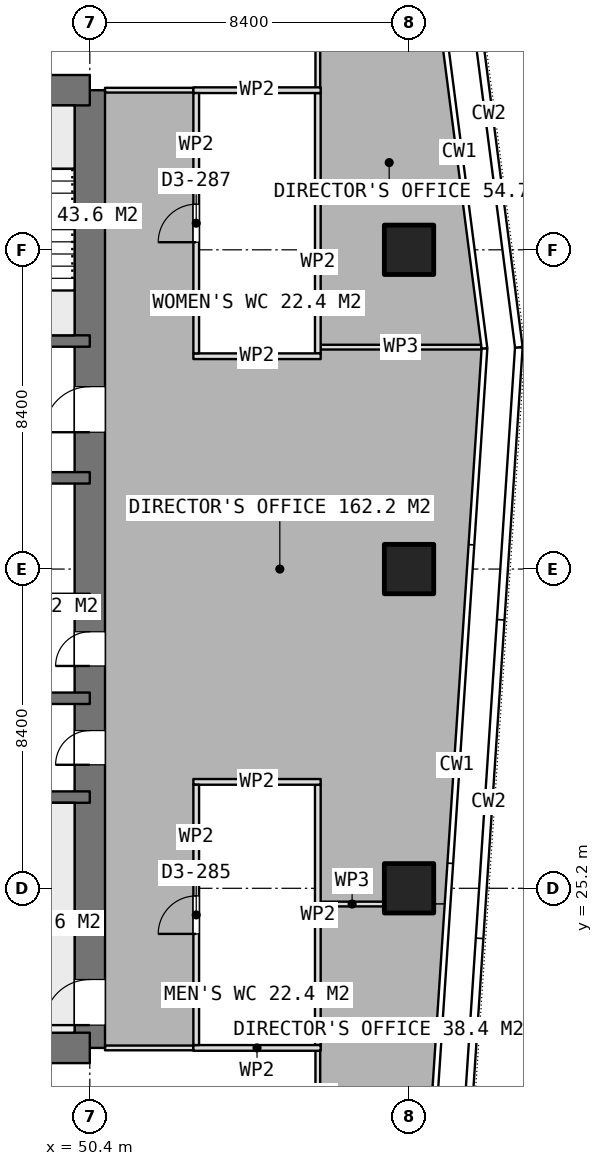
"""IFC4 building model, lengths in metres.
Left out: names, types, materials, properties, quantities, classifications, styles, units other than length and angle.
Written with IfcOpenShell. Run it as: python <this file> out.ifc"""

import sys

from ifc_helpers import new_model, si_unit, direction, frame, frame_2d, origin, origin_2d, place, context, subcontext, project, spatial, rectangle, extrude, element, fill, save


model = new_model("IFC4")
c1 = context("Model", 3, precision=1e-05, world=origin(), true_north=direction((0.0, 1.0)))
c2 = subcontext(c1, "Body", "Model", "MODEL_VIEW")
j1 = project(units=[si_unit("LENGTHUNIT", "METRE"), si_unit("PLANEANGLEUNIT", "RADIAN")], contexts=[c1])
p1 = place(None, origin())
s1 = spatial("IfcSite", under=j1, at=p1, CompositionType="ELEMENT")
p2 = place(p1, origin())
s2 = spatial("IfcBuilding", under=s1, at=p2, CompositionType="ELEMENT")
p3 = place(p2, frame((0.0, 0.0, 265.1)))
s3 = spatial("IfcBuildingStorey", under=s2, at=p3, CompositionType="ELEMENT", Elevation=265.1)
for number, where, z_axis, x_axis in (
    (1, (40.0, 21.0, 0.0), (0.0, 0.0, 1.0), (1.0, 0.0, 0.0)),
    (2, (40.0, 46.2, 0.0), (0.0, 0.0, 1.0), (1.0, 0.0, 0.0)),
):
    element("IfcWall", number, at=place(p3, frame(where, z_axis=z_axis, x_axis=x_axis)), inside=s3, PredefinedType="SHEAR", context=c2, shape_type="SweptSolid", body=[
        extrude(rectangle(XDim=10.4, YDim=0.8, at=frame_2d((5.2, 0.0))), origin(), (0.0, 0.0, 1.0), 3.75),
    ])
p4 = place(p3, frame((50.4, 21.0, 0.0), z_axis=(0.0, 0.0, 1.0), x_axis=(0.0, 1.0, 0.0)))
e3 = element("IfcWall", 3, at=p4, inside=s3, PredefinedType="SHEAR", context=c2, shape_type="SweptSolid", body=[
    extrude(rectangle(XDim=25.2, YDim=0.8, at=frame_2d((12.6, 0.0))), origin(), (0.0, 0.0, 1.0), 3.75),
])
p5 = place(p4, frame((16.2, 0.0, 0.0)))
e4 = element("IfcOpeningElement", 4, at=p5, cuts=e3, PredefinedType="OPENING", context=c2, shape_type="SweptSolid", body=[
    extrude(rectangle(XDim=1.2, YDim=2.1, at=frame_2d((0.6, 1.05))), frame((0.0, 0.41, 0.0), z_axis=(0.0, -1.0, 0.0), x_axis=(1.0, 0.0, 0.0)), (0.0, 0.0, 1.0), 0.82),
])
p6 = place(p4, frame((10.05, 0.0, 0.0)))
e5 = element("IfcOpeningElement", 5, at=p6, cuts=e3, PredefinedType="OPENING", context=c2, shape_type="SweptSolid", body=[
    extrude(rectangle(XDim=0.9, YDim=2.1, at=frame_2d((0.45, 1.05))), frame((0.0, 0.41, 0.0), z_axis=(0.0, -1.0, 0.0), x_axis=(1.0, 0.0, 0.0)), (0.0, 0.0, 1.0), 0.82),
])
p7 = place(p4, frame((7.45, 0.0, 0.0)))
e6 = element("IfcOpeningElement", 6, at=p7, cuts=e3, PredefinedType="OPENING", context=c2, shape_type="SweptSolid", body=[
    extrude(rectangle(XDim=0.9, YDim=2.1, at=frame_2d((0.45, 1.05))), frame((0.0, 0.41, 0.0), z_axis=(0.0, -1.0, 0.0), x_axis=(1.0, 0.0, 0.0)), (0.0, 0.0, 1.0), 0.82),
])
p8 = place(p4, frame((0.6, 0.0, 0.0)))
e7 = element("IfcOpeningElement", 7, at=p8, cuts=e3, PredefinedType="OPENING", context=c2, shape_type="SweptSolid", body=[
    extrude(rectangle(XDim=1.2, YDim=2.1, at=frame_2d((0.6, 1.05))), frame((0.0, 0.41, 0.0), z_axis=(0.0, -1.0, 0.0), x_axis=(1.0, 0.0, 0.0)), (0.0, 0.0, 1.0), 0.82),
])
for number, where, z_axis, x_axis in (
    (8, (43.8, 27.6, 0.0), (0.0, 0.0, 1.0), (1.0, 0.0, 0.0)),
    (9, (43.8, 30.2, 0.0), (0.0, 0.0, 1.0), (1.0, 0.0, 0.0)),
    (10, (43.8, 32.8, 0.0), (0.0, 0.0, 1.0), (1.0, 0.0, 0.0)),
):
    element("IfcWall", number, at=place(p3, frame(where, z_axis=z_axis, x_axis=x_axis)), inside=s3, PredefinedType="SHEAR", context=c2, shape_type="SweptSolid", body=[
        extrude(rectangle(XDim=6.6, YDim=0.3, at=frame_2d((3.3, 0.0))), origin(), (0.0, 0.0, 1.0), 3.75),
    ])
p9 = place(p3, frame((43.8, 36.0, 0.0), z_axis=(0.0, 0.0, 1.0), x_axis=(1.0, 0.0, 0.0)))
e11 = element("IfcWall", 11, at=p9, inside=s3, PredefinedType="SHEAR", context=c2, shape_type="SweptSolid", body=[
    extrude(rectangle(XDim=6.6, YDim=0.3, at=frame_2d((3.3, 0.0))), origin(), (0.0, 0.0, 1.0), 3.75),
])
p10 = place(p9, frame((2.65, 0.0, 0.0)))
e12 = element("IfcOpeningElement", 12, at=p10, cuts=e11, PredefinedType="OPENING", context=c2, shape_type="SweptSolid", body=[
    extrude(rectangle(XDim=1.3, YDim=2.1, at=frame_2d((0.65, 1.05))), frame((0.0, 0.16, 0.0), z_axis=(0.0, -1.0, 0.0), x_axis=(1.0, 0.0, 0.0)), (0.0, 0.0, 1.0), 0.32),
])
p11 = place(p3, frame((43.8, 39.6, 0.0), z_axis=(0.0, 0.0, 1.0), x_axis=(1.0, 0.0, 0.0)))
e13 = element("IfcWall", 13, at=p11, inside=s3, PredefinedType="SHEAR", context=c2, shape_type="SweptSolid", body=[
    extrude(rectangle(XDim=6.6, YDim=0.3, at=frame_2d((3.3, 0.0))), origin(), (0.0, 0.0, 1.0), 3.75),
])
p12 = place(p11, frame((0.35, 0.0, 0.0)))
e14 = element("IfcOpeningElement", 14, at=p12, cuts=e13, PredefinedType="OPENING", context=c2, shape_type="SweptSolid", body=[
    extrude(rectangle(XDim=1.2, YDim=2.1, at=frame_2d((0.6, 1.05))), frame((0.0, 0.16, 0.0), z_axis=(0.0, -1.0, 0.0), x_axis=(1.0, 0.0, 0.0)), (0.0, 0.0, 1.0), 0.32),
])
for number, where, z_axis, x_axis in (
    (15, (58.8, 25.2, 0.0), (0.0, 0.0, 1.0), (1.0, 0.0, 0.0)),
    (16, (58.8, 33.6, 0.0), (0.0, 0.0, 1.0), (1.0, 0.0, 0.0)),
    (17, (58.8, 42.0, 0.0), (0.0, 0.0, 1.0), (1.0, 0.0, 0.0)),
):
    element("IfcColumn", number, at=place(p3, frame(where, z_axis=z_axis, x_axis=x_axis)), inside=s3, PredefinedType="COLUMN", context=c2, shape_type="SweptSolid", body=[
        extrude(rectangle(XDim=1.3, YDim=1.3, at=origin_2d()), origin(), (0.0, 0.0, 1.0), 3.75),
    ])
for number, where, z_axis, x_axis in (
    (18, (53.125, 39.2, 0.0), (0.0, 0.0, 1.0), (1.0, 0.0, 0.0)),
    (19, (53.125, 46.2, 0.0), (0.0, 0.0, 1.0), (1.0, 0.0, 0.0)),
):
    element("IfcWall", number, at=place(p3, frame(where, z_axis=z_axis, x_axis=x_axis)), inside=s3, PredefinedType="PARTITIONING", context=c2, shape_type="SweptSolid", body=[
        extrude(rectangle(XDim=3.35, YDim=0.15, at=frame_2d((1.675, 0.0))), origin(), (0.0, 0.0, 1.0), 3.5),
    ])
p13 = place(p3, frame((53.2, 39.275, 0.0), z_axis=(0.0, 0.0, 1.0), x_axis=(0.0, 1.0, 0.0)))
e20 = element("IfcWall", 20, at=p13, inside=s3, PredefinedType="PARTITIONING", context=c2, shape_type="SweptSolid", body=[
    extrude(rectangle(XDim=6.85, YDim=0.15, at=frame_2d((3.425, 0.0))), origin(), (0.0, 0.0, 1.0), 3.5),
])
p14 = place(p13, frame((2.925, 0.0, 0.0)))
e21 = element("IfcOpeningElement", 21, at=p14, cuts=e20, PredefinedType="OPENING", context=c2, shape_type="SweptSolid", body=[
    extrude(rectangle(XDim=1.0, YDim=2.1, at=frame_2d((0.5, 1.05))), frame((0.0, 0.085, 0.0), z_axis=(0.0, -1.0, 0.0), x_axis=(1.0, 0.0, 0.0)), (0.0, 0.0, 1.0), 0.17),
])
p15 = place(p3, frame((56.4, 39.275, 0.0), z_axis=(0.0, 0.0, 1.0), x_axis=(0.0, 1.0, 0.0)))
e22 = element("IfcWall", 22, at=p15, inside=s3, PredefinedType="PARTITIONING", context=c2, shape_type="SweptSolid", body=[
    extrude(rectangle(XDim=6.85, YDim=0.15, at=frame_2d((3.425, 0.0))), origin(), (0.0, 0.0, 1.0), 3.5),
])
for number, where, z_axis, x_axis in (
    (23, (53.125, 21.0, 0.0), (0.0, 0.0, 1.0), (1.0, 0.0, 0.0)),
    (24, (53.125, 28.0, 0.0), (0.0, 0.0, 1.0), (1.0, 0.0, 0.0)),
):
    element("IfcWall", number, at=place(p3, frame(where, z_axis=z_axis, x_axis=x_axis)), inside=s3, PredefinedType="PARTITIONING", context=c2, shape_type="SweptSolid", body=[
        extrude(rectangle(XDim=3.35, YDim=0.15, at=frame_2d((1.675, 0.0))), origin(), (0.0, 0.0, 1.0), 3.5),
    ])
p16 = place(p3, frame((53.2, 21.075, 0.0), z_axis=(0.0, 0.0, 1.0), x_axis=(0.0, 1.0, 0.0)))
e25 = element("IfcWall", 25, at=p16, inside=s3, PredefinedType="PARTITIONING", context=c2, shape_type="SweptSolid", body=[
    extrude(rectangle(XDim=6.85, YDim=0.15, at=frame_2d((3.425, 0.0))), origin(), (0.0, 0.0, 1.0), 3.5),
])
p17 = place(p16, frame((2.925, 0.0, 0.0)))
e26 = element("IfcOpeningElement", 26, at=p17, cuts=e25, PredefinedType="OPENING", context=c2, shape_type="SweptSolid", body=[
    extrude(rectangle(XDim=1.0, YDim=2.1, at=frame_2d((0.5, 1.05))), frame((0.0, 0.085, 0.0), z_axis=(0.0, -1.0, 0.0), x_axis=(1.0, 0.0, 0.0)), (0.0, 0.0, 1.0), 0.17),
])
p18 = place(p3, frame((56.4, 21.075, 0.0), z_axis=(0.0, 0.0, 1.0), x_axis=(0.0, 1.0, 0.0)))
e27 = element("IfcWall", 27, at=p18, inside=s3, PredefinedType="PARTITIONING", context=c2, shape_type="SweptSolid", body=[
    extrude(rectangle(XDim=6.85, YDim=0.15, at=frame_2d((3.425, 0.0))), origin(), (0.0, 0.0, 1.0), 3.5),
])
for number, where, z_axis, x_axis in (
    (28, (53.124, 21.0, 0.0), (0.0, 0.0, 1.0), (-1.0, 0.0, 0.0)),
    (29, (50.8, 46.2, 0.0), (0.0, 0.0, 1.0), (1.0, 0.0, 0.0)),
):
    element("IfcWall", number, at=place(p3, frame(where, z_axis=z_axis, x_axis=x_axis)), inside=s3, PredefinedType="PARTITIONING", context=c2, shape_type="SweptSolid", body=[
        extrude(rectangle(XDim=2.324, YDim=0.125, at=frame_2d((1.162, 0.0))), origin(), (0.0, 0.0, 1.0), 3.5),
    ])
p19 = place(p3, frame((56.475, 39.439, 0.0), z_axis=(0.0, 0.0, 1.0), x_axis=(1.0, 0.0, 0.0)))
e30 = element("IfcWall", 30, at=p19, inside=s3, PredefinedType="PARTITIONING", context=c2, shape_type="SweptSolid", body=[
    extrude(rectangle(XDim=4.225, YDim=0.125, at=frame_2d((2.112, 0.0))), origin(), (0.0, 0.0, 1.0), 3.5),
])
p20 = place(p3, frame((56.4, 46.125, 0.0), z_axis=(0.0, 0.0, 1.0), x_axis=(0.0, 1.0, 0.0)))
e31 = element("IfcWall", 31, at=p20, inside=s3, PredefinedType="PARTITIONING", context=c2, shape_type="SweptSolid", body=[
    extrude(rectangle(XDim=3.025, YDim=0.125, at=frame_2d((1.512, 0.0))), origin(), (0.0, 0.0, 1.0), 3.5),
])
p21 = place(p3, frame((56.475, 24.786, 0.0), z_axis=(0.0, 0.0, 1.0), x_axis=(1.0, 0.0, 0.0)))
e32 = element("IfcWall", 32, at=p21, inside=s3, PredefinedType="PARTITIONING", context=c2, shape_type="SweptSolid", body=[
    extrude(rectangle(XDim=1.655, YDim=0.125, at=frame_2d((0.827, 0.0))), origin(), (0.0, 0.0, 1.0), 3.5),
])
p22 = place(p3, frame((56.4, 18.4, 0.0), z_axis=(0.0, 0.0, 1.0), x_axis=(0.0, 1.0, 0.0)))
e33 = element("IfcWall", 33, at=p22, inside=s3, PredefinedType="PARTITIONING", context=c2, shape_type="SweptSolid", body=[
    extrude(rectangle(XDim=2.675, YDim=0.125, at=frame_2d((1.337, 0.0))), origin(), (0.0, 0.0, 1.0), 3.5),
])
p23 = place(p5, origin())
e34 = element("IfcDoor", 34, at=p23, inside=s3, OperationType="SINGLE_SWING_LEFT", PredefinedType="DOOR", context=c2, shape_type="SweptSolid", body=[
    extrude(rectangle(XDim=1.2, YDim=2.1, at=frame_2d((0.6, 1.05))), frame((0.0, 0.025, 0.0), z_axis=(0.0, -1.0, 0.0), x_axis=(1.0, 0.0, 0.0)), (0.0, 0.0, 1.0), 0.05),
])
fill(e4, e34)
p24 = place(p6, origin())
e35 = element("IfcDoor", 35, at=p24, inside=s3, OperationType="SINGLE_SWING_LEFT", PredefinedType="DOOR", context=c2, shape_type="SweptSolid", body=[
    extrude(rectangle(XDim=0.9, YDim=2.1, at=frame_2d((0.45, 1.05))), frame((0.0, 0.025, 0.0), z_axis=(0.0, -1.0, 0.0), x_axis=(1.0, 0.0, 0.0)), (0.0, 0.0, 1.0), 0.05),
])
fill(e5, e35)
p25 = place(p7, origin())
e36 = element("IfcDoor", 36, at=p25, inside=s3, OperationType="SINGLE_SWING_LEFT", PredefinedType="DOOR", context=c2, shape_type="SweptSolid", body=[
    extrude(rectangle(XDim=0.9, YDim=2.1, at=frame_2d((0.45, 1.05))), frame((0.0, 0.025, 0.0), z_axis=(0.0, -1.0, 0.0), x_axis=(1.0, 0.0, 0.0)), (0.0, 0.0, 1.0), 0.05),
])
fill(e6, e36)
p26 = place(p14, origin())
e37 = element("IfcDoor", 37, at=p26, inside=s3, OperationType="SINGLE_SWING_LEFT", PredefinedType="DOOR", context=c2, shape_type="SweptSolid", body=[
    extrude(rectangle(XDim=1.0, YDim=2.1, at=frame_2d((0.5, 1.05))), frame((0.0, 0.025, 0.0), z_axis=(0.0, -1.0, 0.0), x_axis=(1.0, 0.0, 0.0)), (0.0, 0.0, 1.0), 0.05),
])
fill(e21, e37)
p27 = place(p17, origin())
e38 = element("IfcDoor", 38, at=p27, inside=s3, OperationType="SINGLE_SWING_LEFT", PredefinedType="DOOR", context=c2, shape_type="SweptSolid", body=[
    extrude(rectangle(XDim=1.0, YDim=2.1, at=frame_2d((0.5, 1.05))), frame((0.0, 0.025, 0.0), z_axis=(0.0, -1.0, 0.0), x_axis=(1.0, 0.0, 0.0)), (0.0, 0.0, 1.0), 0.05),
])
fill(e26, e38)
p28 = place(p8, origin())
e39 = element("IfcDoor", 39, at=p28, inside=s3, OperationType="SINGLE_SWING_RIGHT", PredefinedType="DOOR", context=c2, shape_type="SweptSolid", body=[
    extrude(rectangle(XDim=1.2, YDim=2.1, at=frame_2d((0.6, 1.05))), frame((0.0, 0.025, 0.0), z_axis=(0.0, -1.0, 0.0), x_axis=(1.0, 0.0, 0.0)), (0.0, 0.0, 1.0), 0.05),
])
fill(e7, e39)
save(model, sys.argv[1])
